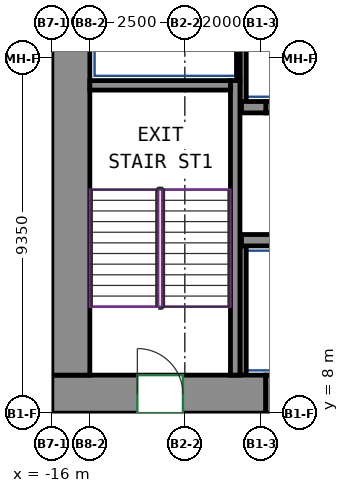
"""IFC4 building model, lengths in metres.
Left out: names, types, materials, properties, quantities, classifications, styles, units other than length and angle.
Written with IfcOpenShell. Run it as: python <this file> out.ifc"""

import sys

from ifc_helpers import new_model, si_unit, direction, frame, frame_2d, origin, place, context, subcontext, project, spatial, rectangle, extrude, source, transform, mapped, element, fill, save


model = new_model("IFC4")
c1 = context("Model", 3, precision=1e-05, world=origin(), true_north=direction((0.0, 1.0)))
c2 = subcontext(c1, "Body", "Model", "MODEL_VIEW")
j1 = project(units=[si_unit("LENGTHUNIT", "METRE"), si_unit("PLANEANGLEUNIT", "RADIAN")], contexts=[c1])
p1 = place(None, origin())
s1 = spatial("IfcSite", under=j1, at=p1, CompositionType="ELEMENT")
p2 = place(p1, origin())
s2 = spatial("IfcBuilding", under=s1, at=p2, CompositionType="ELEMENT")
p3 = place(p2, frame((0.0, 0.0, 83.2)))
s3 = spatial("IfcBuildingStorey", under=s2, at=p3, CompositionType="ELEMENT", Elevation=83.2)
m1 = source(origin(), c2, "Body", "SweptSolid", [
    extrude(rectangle(XDim=5.63, YDim=1.0, at=frame_2d((2.815, 0.0))), origin(), (0.0, 0.0, 1.0), 3.72),
])
p4 = place(p3, frame((-16.0, 8.5, 0.0), z_axis=(0.0, 0.0, 1.0), x_axis=(1.0, 0.0, 0.0)))
e1 = element("IfcWall", 1, at=p4, inside=s3, PredefinedType="SHEAR", context=c2, shape_type="MappedRepresentation", body=[
    mapped(m1, transform((0.0, 0.0, 0.0))),
])
p5 = place(p4, frame((2.25, 0.0, 0.0)))
e2 = element("IfcOpeningElement", 2, at=p5, cuts=e1, PredefinedType="OPENING", context=c2, shape_type="SweptSolid", body=[
    extrude(rectangle(XDim=1.2, YDim=2.1, at=frame_2d((0.6, 1.05))), frame((0.0, 0.51, 0.0), z_axis=(0.0, -1.0, 0.0), x_axis=(1.0, 0.0, 0.0)), (0.0, 0.0, 1.0), 1.02),
])
m2 = source(origin(), c2, "Body", "SweptSolid", [
    extrude(rectangle(XDim=12.0, YDim=1.0, at=frame_2d((6.0, 0.0))), origin(), (0.0, 0.0, 1.0), 3.72),
])
p6 = place(p3, frame((-15.5, 9.0, 0.0), z_axis=(0.0, 0.0, 1.0), x_axis=(0.0, 1.0, 0.0)))
e3 = element("IfcWall", 3, at=p6, inside=s3, PredefinedType="SHEAR", context=c2, shape_type="MappedRepresentation", body=[
    mapped(m2, transform((0.0, 0.0, 0.0))),
])
m3 = source(origin(), c2, "Body", "SweptSolid", [
    extrude(rectangle(XDim=7.75, YDim=0.25, at=frame_2d((3.875, 0.0))), origin(), (0.0, 0.0, 1.0), 3.72),
])
p7 = place(p3, frame((-11.175, 9.0, 0.0), z_axis=(0.0, 0.0, 1.0), x_axis=(0.0, 1.0, 0.0)))
e4 = element("IfcWall", 4, at=p7, inside=s3, PredefinedType="SHEAR", context=c2, shape_type="MappedRepresentation", body=[
    mapped(m3, transform((0.0, 0.0, 0.0))),
])
m4 = source(origin(), c2, "Body", "SweptSolid", [
    extrude(rectangle(XDim=3.7, YDim=0.25, at=frame_2d((1.85, 0.0))), origin(), (0.0, 0.0, 1.0), 3.72),
])
p8 = place(p3, frame((-15.0, 16.625, 0.0), z_axis=(0.0, 0.0, 1.0), x_axis=(1.0, 0.0, 0.0)))
e5 = element("IfcWall", 5, at=p8, inside=s3, PredefinedType="SHEAR", context=c2, shape_type="MappedRepresentation", body=[
    mapped(m4, transform((0.0, 0.0, 0.0))),
])
m5 = source(origin(), c2, "Body", "SweptSolid", [
    extrude(rectangle(XDim=6.0, YDim=0.3, at=frame_2d((3.0, 0.0))), origin(), (0.0, 0.0, 1.0), 3.72),
])
p9 = place(p3, frame((-11.01, 12.55, 0.0), z_axis=(0.0, 0.0, 1.0), x_axis=(1.0, 0.0, 0.0)))
e6 = element("IfcWall", 6, at=p9, inside=s3, PredefinedType="SHEAR", context=c2, shape_type="MappedRepresentation", body=[
    mapped(m5, transform((0.0, 0.0, 0.0))),
])
m6 = source(origin(), c2, "Body", "SweptSolid", [
    extrude(rectangle(XDim=0.64, YDim=0.3, at=frame_2d((0.32, 0.0))), origin(), (0.0, 0.0, 1.0), 3.72),
])
p10 = place(p3, frame((-11.01, 16.05, 0.0), z_axis=(0.0, 0.0, 1.0), x_axis=(1.0, 0.0, 0.0)))
e7 = element("IfcWall", 7, at=p10, inside=s3, PredefinedType="SHEAR", context=c2, shape_type="MappedRepresentation", body=[
    mapped(m6, transform((0.0, 0.0, 0.0))),
])
m7 = source(origin(), c2, "Body", "SweptSolid", [
    extrude(rectangle(XDim=1.4, YDim=0.3, at=frame_2d((0.7, 0.0))), origin(), (0.0, 0.0, 1.0), 3.72),
])
p11 = place(p3, frame((-10.37, 16.05, 0.0), z_axis=(0.0, 0.0, 1.0), x_axis=(1.0, 0.0, 0.0)))
e8 = element("IfcWall", 8, at=p11, inside=s3, PredefinedType="PARTITIONING", context=c2, shape_type="MappedRepresentation", body=[
    mapped(m7, transform((0.0, 0.0, 0.0))),
])
p12 = place(p11, frame((0.15, 0.0, 0.0)))
e9 = element("IfcOpeningElement", 9, at=p12, cuts=e8, PredefinedType="OPENING", context=c2, shape_type="SweptSolid", body=[
    extrude(rectangle(XDim=1.1, YDim=2.1, at=frame_2d((0.55, 1.05))), frame((0.0, 0.16, 0.0), z_axis=(0.0, -1.0, 0.0), x_axis=(1.0, 0.0, 0.0)), (0.0, 0.0, 1.0), 0.32),
])
m8 = source(origin(), c2, "Body", "SweptSolid", [
    extrude(rectangle(XDim=3.275, YDim=0.165, at=frame_2d((1.638, 0.0))), origin(), (0.0, 0.0, 1.0), 3.72),
])
p13 = place(p3, frame((-10.968, 16.2, 0.0), z_axis=(0.0, 0.0, 1.0), x_axis=(0.0, 1.0, 0.0)))
e10 = element("IfcWall", 10, at=p13, inside=s3, PredefinedType="PARTITIONING", context=c2, shape_type="MappedRepresentation", body=[
    mapped(m8, transform((0.0, 0.0, 0.0))),
])
m9 = source(origin(), c2, "Body", "SweptSolid", [
    extrude(rectangle(XDim=2.725, YDim=0.085, at=frame_2d((1.363, 0.0))), origin(), (0.0, 0.0, 1.0), 3.72),
])
p14 = place(p3, frame((-11.093, 16.75, 0.0), z_axis=(0.0, 0.0, 1.0), x_axis=(0.0, 1.0, 0.0)))
e11 = element("IfcWall", 11, at=p14, inside=s3, PredefinedType="PARTITIONING", context=c2, shape_type="MappedRepresentation", body=[
    mapped(m9, transform((0.0, 0.0, 0.0))),
])
m10 = source(origin(), c2, "Body", "SweptSolid", [
    extrude(rectangle(XDim=3.4, YDim=0.165, at=frame_2d((1.7, 0.0))), origin(), (0.0, 0.0, 1.0), 3.72),
])
p15 = place(p3, frame((-10.968, 9.0, 0.0), z_axis=(0.0, 0.0, 1.0), x_axis=(0.0, 1.0, 0.0)))
e12 = element("IfcWall", 12, at=p15, inside=s3, PredefinedType="PARTITIONING", context=c2, shape_type="MappedRepresentation", body=[
    mapped(m10, transform((0.0, 0.0, 0.0))),
])
m11 = source(origin(), c2, "Body", "SweptSolid", [
    extrude(rectangle(XDim=1.4, YDim=1.0, at=frame_2d((0.7, 0.0))), origin(), (0.0, 0.0, 1.0), 2.7),
])
p16 = place(p3, frame((-10.37, 8.5, 0.0), z_axis=(0.0, 0.0, 1.0), x_axis=(1.0, 0.0, 0.0)))
e13 = element("IfcWall", 13, at=p16, inside=s3, PredefinedType="PARTITIONING", context=c2, shape_type="MappedRepresentation", body=[
    mapped(m11, transform((0.0, 0.0, 0.0))),
])
p17 = place(p16, frame((0.25, 0.0, 0.0)))
e14 = element("IfcOpeningElement", 14, at=p17, cuts=e13, PredefinedType="OPENING", context=c2, shape_type="SweptSolid", body=[
    extrude(rectangle(XDim=0.9, YDim=2.1, at=frame_2d((0.45, 1.05))), frame((0.0, 0.51, 0.0), z_axis=(0.0, -1.0, 0.0), x_axis=(1.0, 0.0, 0.0)), (0.0, 0.0, 1.0), 1.02),
])
p18 = place(p5, origin())
e15 = element("IfcDoor", 15, at=p18, inside=s3, OperationType="DOUBLE_DOOR_SINGLE_SWING", PredefinedType="DOOR", context=c2, shape_type="SweptSolid", body=[
    extrude(rectangle(XDim=1.2, YDim=2.1, at=frame_2d((0.6, 1.05))), frame((0.0, 0.405, 0.0), z_axis=(0.0, -1.0, 0.0), x_axis=(1.0, 0.0, 0.0)), (0.0, 0.0, 1.0), 0.05),
])
fill(e2, e15)
save(model, sys.argv[1])
